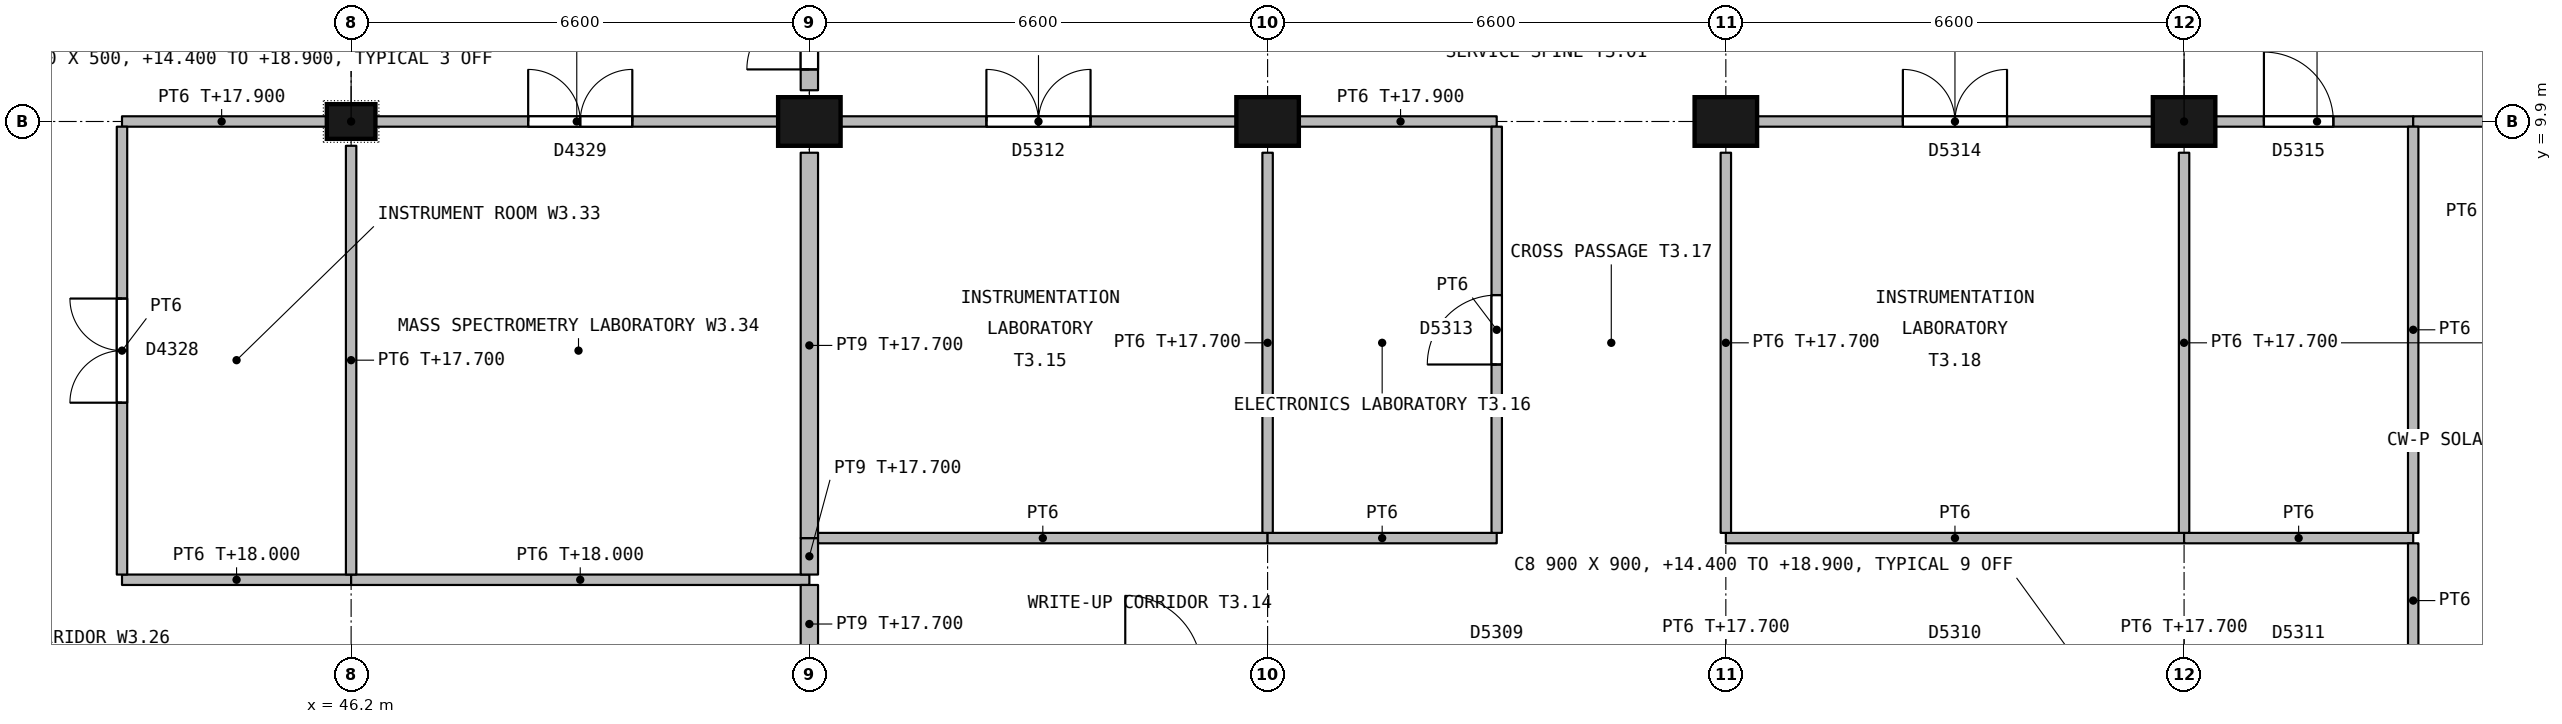
"""IFC4 building model, lengths in metres.
Left out: names, types, materials, properties, quantities, classifications, styles, units other than length and angle.
Written with IfcOpenShell. Run it as: python <this file> out.ifc"""

import sys

from ifc_helpers import new_model, si_unit, direction, frame, frame_2d, origin, origin_2d, place, context, subcontext, project, spatial, rectangle, extrude, element, fill, save


model = new_model("IFC4")
c1 = context("Model", 3, precision=1e-05, world=origin(), true_north=direction((0.0, 1.0)))
c2 = subcontext(c1, "Body", "Model", "MODEL_VIEW")
j1 = project(units=[si_unit("LENGTHUNIT", "METRE"), si_unit("PLANEANGLEUNIT", "RADIAN")], contexts=[c1])
p1 = place(None, origin())
s1 = spatial("IfcSite", under=j1, at=p1, CompositionType="ELEMENT")
p2 = place(p1, origin())
s2 = spatial("IfcBuilding", under=s1, at=p2, CompositionType="ELEMENT")
p3 = place(p2, frame((0.0, 0.0, 14.4)))
s3 = spatial("IfcBuildingStorey", under=s2, at=p3, CompositionType="ELEMENT", Elevation=14.4)
p4 = place(p3, frame((46.2, 9.9, 0.0), z_axis=(0.0, 0.0, 1.0), x_axis=(1.0, 0.0, 0.0)))
e1 = element("IfcColumn", 1, at=p4, inside=s3, PredefinedType="COLUMN", context=c2, shape_type="SweptSolid", body=[
    extrude(rectangle(XDim=0.7, YDim=0.5, at=origin_2d()), origin(), (0.0, 0.0, 1.0), 4.5),
])
for number, where, z_axis, x_axis in (
    (2, (52.8, 9.9, 0.0), (0.0, 0.0, 1.0), (1.0, 0.0, 0.0)),
    (3, (59.4, 9.9, 0.0), (0.0, 0.0, 1.0), (1.0, 0.0, 0.0)),
    (4, (66.0, 9.9, 0.0), (0.0, 0.0, 1.0), (1.0, 0.0, 0.0)),
    (5, (72.6, 9.9, 0.0), (0.0, 0.0, 1.0), (1.0, 0.0, 0.0)),
):
    element("IfcColumn", number, at=place(p3, frame(where, z_axis=z_axis, x_axis=x_axis)), inside=s3, PredefinedType="COLUMN", context=c2, shape_type="SweptSolid", body=[
        extrude(rectangle(XDim=0.9, YDim=0.7, at=origin_2d()), origin(), (0.0, 0.0, 1.0), 4.5),
    ])
p5 = place(p3, frame((42.9, 9.9, 0.0), z_axis=(0.0, 0.0, 1.0), x_axis=(1.0, 0.0, 0.0)))
e6 = element("IfcWall", 6, at=p5, inside=s3, PredefinedType="PARTITIONING", context=c2, shape_type="SweptSolid", body=[
    extrude(rectangle(XDim=2.95, YDim=0.15, at=frame_2d((1.475, 0.0))), origin(), (0.0, 0.0, 1.0), 3.5),
])
p6 = place(p3, frame((46.55, 9.9, 0.0), z_axis=(0.0, 0.0, 1.0), x_axis=(1.0, 0.0, 0.0)))
e7 = element("IfcWall", 7, at=p6, inside=s3, PredefinedType="PARTITIONING", context=c2, shape_type="SweptSolid", body=[
    extrude(rectangle(XDim=5.8, YDim=0.15, at=frame_2d((2.9, 0.0))), origin(), (0.0, 0.0, 1.0), 3.5),
])
p7 = place(p6, frame((2.2, 0.0, 0.0)))
e8 = element("IfcOpeningElement", 8, at=p7, cuts=e7, PredefinedType="OPENING", context=c2, shape_type="SweptSolid", body=[
    extrude(rectangle(XDim=1.5, YDim=2.1, at=frame_2d((0.75, 1.05))), frame((0.0, 0.085, 0.0), z_axis=(0.0, -1.0, 0.0), x_axis=(1.0, 0.0, 0.0)), (0.0, 0.0, 1.0), 0.17),
])
p8 = place(p3, frame((52.8, 10.35, 0.0), z_axis=(0.0, 0.0, 1.0), x_axis=(0.0, 1.0, 0.0)))
e9 = element("IfcWall", 9, at=p8, inside=s3, PredefinedType="PARTITIONING", context=c2, shape_type="SweptSolid", body=[
    extrude(rectangle(XDim=2.4, YDim=0.25, at=frame_2d((1.2, 0.0))), origin(), (0.0, 0.0, 1.0), 3.6),
])
p9 = place(p8, frame((0.3, 0.0, 0.0)))
e10 = element("IfcOpeningElement", 10, at=p9, cuts=e9, PredefinedType="OPENING", context=c2, shape_type="SweptSolid", body=[
    extrude(rectangle(XDim=1.8, YDim=2.1, at=frame_2d((0.9, 1.05))), frame((0.0, 0.135, 0.0), z_axis=(0.0, -1.0, 0.0), x_axis=(1.0, 0.0, 0.0)), (0.0, 0.0, 1.0), 0.27),
])
p10 = place(p3, frame((46.2, 3.3, 0.0), z_axis=(0.0, 0.0, 1.0), x_axis=(-1.0, 0.0, 0.0)))
e11 = element("IfcWall", 11, at=p10, inside=s3, PredefinedType="PARTITIONING", context=c2, shape_type="SweptSolid", body=[
    extrude(rectangle(XDim=3.3, YDim=0.15, at=frame_2d((1.65, 0.0))), origin(), (0.0, 0.0, 1.0), 3.6),
])
p11 = place(p3, frame((52.8, 3.3, 0.0), z_axis=(0.0, 0.0, 1.0), x_axis=(-1.0, 0.0, 0.0)))
e12 = element("IfcWall", 12, at=p11, inside=s3, PredefinedType="PARTITIONING", context=c2, shape_type="SweptSolid", body=[
    extrude(rectangle(XDim=6.6, YDim=0.15, at=frame_2d((3.3, 0.0))), origin(), (0.0, 0.0, 1.0), 3.6),
])
p12 = place(p3, frame((52.8, 2.1, 0.0), z_axis=(0.0, 0.0, 1.0), x_axis=(0.0, 1.0, 0.0)))
e13 = element("IfcWall", 13, at=p12, inside=s3, PredefinedType="PARTITIONING", context=c2, shape_type="SweptSolid", body=[
    extrude(rectangle(XDim=1.125, YDim=0.25, at=frame_2d((0.562, 0.0))), origin(), (0.0, 0.0, 1.0), 3.3),
])
p13 = place(p3, frame((42.9, 3.375, 0.0), z_axis=(0.0, 0.0, 1.0), x_axis=(0.0, 1.0, 0.0)))
e14 = element("IfcWall", 14, at=p13, inside=s3, PredefinedType="PARTITIONING", context=c2, shape_type="SweptSolid", body=[
    extrude(rectangle(XDim=6.45, YDim=0.15, at=frame_2d((3.225, 0.0))), origin(), (0.0, 0.0, 1.0), 4.2),
])
p14 = place(p13, frame((2.475, 0.0, 0.0)))
e15 = element("IfcOpeningElement", 15, at=p14, cuts=e14, PredefinedType="OPENING", context=c2, shape_type="SweptSolid", body=[
    extrude(rectangle(XDim=1.5, YDim=2.1, at=frame_2d((0.75, 1.05))), frame((0.0, 0.085, 0.0), z_axis=(0.0, -1.0, 0.0), x_axis=(1.0, 0.0, 0.0)), (0.0, 0.0, 1.0), 0.17),
])
p15 = place(p3, frame((46.2, 3.375, 0.0), z_axis=(0.0, 0.0, 1.0), x_axis=(0.0, 1.0, 0.0)))
e16 = element("IfcWall", 16, at=p15, inside=s3, PredefinedType="PARTITIONING", context=c2, shape_type="SweptSolid", body=[
    extrude(rectangle(XDim=6.175, YDim=0.15, at=frame_2d((3.087, 0.0))), origin(), (0.0, 0.0, 1.0), 3.3),
])
p16 = place(p3, frame((52.8, 3.375, 0.0), z_axis=(0.0, 0.0, 1.0), x_axis=(0.0, 1.0, 0.0)))
e17 = element("IfcWall", 17, at=p16, inside=s3, PredefinedType="PARTITIONING", context=c2, shape_type="SweptSolid", body=[
    extrude(rectangle(XDim=0.525, YDim=0.25, at=frame_2d((0.262, 0.0))), origin(), (0.0, 0.0, 1.0), 3.3),
])
p17 = place(p3, frame((52.8, 3.9, 0.0), z_axis=(0.0, 0.0, 1.0), x_axis=(0.0, 1.0, 0.0)))
e18 = element("IfcWall", 18, at=p17, inside=s3, PredefinedType="PARTITIONING", context=c2, shape_type="SweptSolid", body=[
    extrude(rectangle(XDim=5.55, YDim=0.25, at=frame_2d((2.775, 0.0))), origin(), (0.0, 0.0, 1.0), 3.3),
])
p18 = place(p3, frame((53.25, 9.9, 0.0), z_axis=(0.0, 0.0, 1.0), x_axis=(1.0, 0.0, 0.0)))
e19 = element("IfcWall", 19, at=p18, inside=s3, PredefinedType="PARTITIONING", context=c2, shape_type="SweptSolid", body=[
    extrude(rectangle(XDim=5.7, YDim=0.15, at=frame_2d((2.85, 0.0))), origin(), (0.0, 0.0, 1.0), 3.5),
])
p19 = place(p18, frame((2.1, 0.0, 0.0)))
e20 = element("IfcOpeningElement", 20, at=p19, cuts=e19, PredefinedType="OPENING", context=c2, shape_type="SweptSolid", body=[
    extrude(rectangle(XDim=1.5, YDim=2.1, at=frame_2d((0.75, 1.05))), frame((0.0, 0.085, 0.0), z_axis=(0.0, -1.0, 0.0), x_axis=(1.0, 0.0, 0.0)), (0.0, 0.0, 1.0), 0.17),
])
p20 = place(p3, frame((59.85, 9.9, 0.0), z_axis=(0.0, 0.0, 1.0), x_axis=(1.0, 0.0, 0.0)))
e21 = element("IfcWall", 21, at=p20, inside=s3, PredefinedType="PARTITIONING", context=c2, shape_type="SweptSolid", body=[
    extrude(rectangle(XDim=2.85, YDim=0.15, at=frame_2d((1.425, 0.0))), origin(), (0.0, 0.0, 1.0), 3.5),
])
p21 = place(p3, frame((66.45, 9.9, 0.0), z_axis=(0.0, 0.0, 1.0), x_axis=(1.0, 0.0, 0.0)))
e22 = element("IfcWall", 22, at=p21, inside=s3, PredefinedType="PARTITIONING", context=c2, shape_type="SweptSolid", body=[
    extrude(rectangle(XDim=5.7, YDim=0.15, at=frame_2d((2.85, 0.0))), origin(), (0.0, 0.0, 1.0), 3.5),
])
p22 = place(p21, frame((2.1, 0.0, 0.0)))
e23 = element("IfcOpeningElement", 23, at=p22, cuts=e22, PredefinedType="OPENING", context=c2, shape_type="SweptSolid", body=[
    extrude(rectangle(XDim=1.5, YDim=2.1, at=frame_2d((0.75, 1.05))), frame((0.0, 0.085, 0.0), z_axis=(0.0, -1.0, 0.0), x_axis=(1.0, 0.0, 0.0)), (0.0, 0.0, 1.0), 0.17),
])
p23 = place(p3, frame((73.05, 9.9, 0.0), z_axis=(0.0, 0.0, 1.0), x_axis=(1.0, 0.0, 0.0)))
e24 = element("IfcWall", 24, at=p23, inside=s3, PredefinedType="PARTITIONING", context=c2, shape_type="SweptSolid", body=[
    extrude(rectangle(XDim=2.85, YDim=0.15, at=frame_2d((1.425, 0.0))), origin(), (0.0, 0.0, 1.0), 3.5),
])
p24 = place(p23, frame((0.7, 0.0, 0.0)))
e25 = element("IfcOpeningElement", 25, at=p24, cuts=e24, PredefinedType="OPENING", context=c2, shape_type="SweptSolid", body=[
    extrude(rectangle(XDim=1.0, YDim=2.1, at=frame_2d((0.5, 1.05))), frame((0.0, 0.085, 0.0), z_axis=(0.0, -1.0, 0.0), x_axis=(1.0, 0.0, 0.0)), (0.0, 0.0, 1.0), 0.17),
])
p25 = place(p3, frame((75.9, 9.9, 0.0), z_axis=(0.0, 0.0, 1.0), x_axis=(1.0, 0.0, 0.0)))
e26 = element("IfcWall", 26, at=p25, inside=s3, PredefinedType="PARTITIONING", context=c2, shape_type="SweptSolid", body=[
    extrude(rectangle(XDim=2.85, YDim=0.15, at=frame_2d((1.425, 0.0))), origin(), (0.0, 0.0, 1.0), 3.5),
])
p26 = place(p25, frame((1.375, 0.0, 0.0)))
e27 = element("IfcOpeningElement", 27, at=p26, cuts=e26, PredefinedType="OPENING", context=c2, shape_type="SweptSolid", body=[
    extrude(rectangle(XDim=1.0, YDim=2.1, at=frame_2d((0.5, 1.05))), frame((0.0, 0.085, 0.0), z_axis=(0.0, -1.0, 0.0), x_axis=(1.0, 0.0, 0.0)), (0.0, 0.0, 1.0), 0.17),
])
p27 = place(p3, frame((59.4, 3.9, 0.0), z_axis=(0.0, 0.0, 1.0), x_axis=(-1.0, 0.0, 0.0)))
e28 = element("IfcWall", 28, at=p27, inside=s3, PredefinedType="PARTITIONING", context=c2, shape_type="SweptSolid", body=[
    extrude(rectangle(XDim=6.475, YDim=0.15, at=frame_2d((3.237, 0.0))), origin(), (0.0, 0.0, 1.0), 4.2),
])
p28 = place(p3, frame((62.7, 3.9, 0.0), z_axis=(0.0, 0.0, 1.0), x_axis=(-1.0, 0.0, 0.0)))
e29 = element("IfcWall", 29, at=p28, inside=s3, PredefinedType="PARTITIONING", context=c2, shape_type="SweptSolid", body=[
    extrude(rectangle(XDim=3.3, YDim=0.15, at=frame_2d((1.65, 0.0))), origin(), (0.0, 0.0, 1.0), 4.2),
])
p29 = place(p3, frame((72.6, 3.9, 0.0), z_axis=(0.0, 0.0, 1.0), x_axis=(-1.0, 0.0, 0.0)))
e30 = element("IfcWall", 30, at=p29, inside=s3, PredefinedType="PARTITIONING", context=c2, shape_type="SweptSolid", body=[
    extrude(rectangle(XDim=6.6, YDim=0.15, at=frame_2d((3.3, 0.0))), origin(), (0.0, 0.0, 1.0), 4.2),
])
p30 = place(p3, frame((75.9, 3.9, 0.0), z_axis=(0.0, 0.0, 1.0), x_axis=(-1.0, 0.0, 0.0)))
e31 = element("IfcWall", 31, at=p30, inside=s3, PredefinedType="PARTITIONING", context=c2, shape_type="SweptSolid", body=[
    extrude(rectangle(XDim=3.3, YDim=0.15, at=frame_2d((1.65, 0.0))), origin(), (0.0, 0.0, 1.0), 4.2),
])
p31 = place(p3, frame((75.9, 2.175, 0.0), z_axis=(0.0, 0.0, 1.0), x_axis=(0.0, 1.0, 0.0)))
e32 = element("IfcWall", 32, at=p31, inside=s3, PredefinedType="PARTITIONING", context=c2, shape_type="SweptSolid", body=[
    extrude(rectangle(XDim=1.65, YDim=0.15, at=frame_2d((0.825, 0.0))), origin(), (0.0, 0.0, 1.0), 4.2),
])
p32 = place(p3, frame((59.4, 3.975, 0.0), z_axis=(0.0, 0.0, 1.0), x_axis=(0.0, 1.0, 0.0)))
e33 = element("IfcWall", 33, at=p32, inside=s3, PredefinedType="PARTITIONING", context=c2, shape_type="SweptSolid", body=[
    extrude(rectangle(XDim=5.475, YDim=0.15, at=frame_2d((2.737, 0.0))), origin(), (0.0, 0.0, 1.0), 3.3),
])
p33 = place(p3, frame((62.7, 9.825, 0.0), z_axis=(0.0, 0.0, 1.0), x_axis=(0.0, -1.0, 0.0)))
e34 = element("IfcWall", 34, at=p33, inside=s3, PredefinedType="PARTITIONING", context=c2, shape_type="SweptSolid", body=[
    extrude(rectangle(XDim=5.85, YDim=0.15, at=frame_2d((2.925, 0.0))), origin(), (0.0, 0.0, 1.0), 4.2),
])
p34 = place(p33, frame((2.425, 0.0, 0.0)))
e35 = element("IfcOpeningElement", 35, at=p34, cuts=e34, PredefinedType="OPENING", context=c2, shape_type="SweptSolid", body=[
    extrude(rectangle(XDim=1.0, YDim=2.1, at=frame_2d((0.5, 1.05))), frame((0.0, 0.085, 0.0), z_axis=(0.0, -1.0, 0.0), x_axis=(1.0, 0.0, 0.0)), (0.0, 0.0, 1.0), 0.17),
])
for number, where, z_axis, x_axis in (
    (36, (66.0, 3.975, 0.0), (0.0, 0.0, 1.0), (0.0, 1.0, 0.0)),
    (37, (72.6, 3.975, 0.0), (0.0, 0.0, 1.0), (0.0, 1.0, 0.0)),
):
    element("IfcWall", number, at=place(p3, frame(where, z_axis=z_axis, x_axis=x_axis)), inside=s3, PredefinedType="PARTITIONING", context=c2, shape_type="SweptSolid", body=[
        extrude(rectangle(XDim=5.475, YDim=0.15, at=frame_2d((2.737, 0.0))), origin(), (0.0, 0.0, 1.0), 3.3),
    ])
p35 = place(p3, frame((75.9, 3.975, 0.0), z_axis=(0.0, 0.0, 1.0), x_axis=(0.0, 1.0, 0.0)))
e38 = element("IfcWall", 38, at=p35, inside=s3, PredefinedType="PARTITIONING", context=c2, shape_type="SweptSolid", body=[
    extrude(rectangle(XDim=5.85, YDim=0.15, at=frame_2d((2.925, 0.0))), origin(), (0.0, 0.0, 1.0), 4.2),
])
p36 = place(p9, origin())
e39 = element("IfcDoor", 39, at=p36, inside=s3, OperationType="DOUBLE_DOOR_SINGLE_SWING", PredefinedType="DOOR", context=c2, shape_type="SweptSolid", body=[
    extrude(rectangle(XDim=1.8, YDim=2.1, at=frame_2d((0.9, 1.05))), frame((0.0, 0.03, 0.0), z_axis=(0.0, -1.0, 0.0), x_axis=(1.0, 0.0, 0.0)), (0.0, 0.0, 1.0), 0.06),
])
fill(e10, e39)
p37 = place(p14, origin())
e40 = element("IfcDoor", 40, at=p37, inside=s3, OperationType="DOUBLE_DOOR_SINGLE_SWING", PredefinedType="DOOR", context=c2, shape_type="SweptSolid", body=[
    extrude(rectangle(XDim=1.5, YDim=2.1, at=frame_2d((0.75, 1.05))), frame((0.0, 0.027, 0.0), z_axis=(0.0, -1.0, 0.0), x_axis=(1.0, 0.0, 0.0)), (0.0, 0.0, 1.0), 0.054),
])
fill(e15, e40)
p38 = place(p7, origin())
e41 = element("IfcDoor", 41, at=p38, inside=s3, OperationType="DOUBLE_DOOR_SINGLE_SWING", PredefinedType="DOOR", context=c2, shape_type="SweptSolid", body=[
    extrude(rectangle(XDim=1.5, YDim=2.1, at=frame_2d((0.75, 1.05))), frame((0.0, 0.027, 0.0), z_axis=(0.0, -1.0, 0.0), x_axis=(1.0, 0.0, 0.0)), (0.0, 0.0, 1.0), 0.054),
])
fill(e8, e41)
p39 = place(p19, origin())
e42 = element("IfcDoor", 42, at=p39, inside=s3, OperationType="DOUBLE_DOOR_SINGLE_SWING", PredefinedType="DOOR", context=c2, shape_type="SweptSolid", body=[
    extrude(rectangle(XDim=1.5, YDim=2.1, at=frame_2d((0.75, 1.05))), frame((0.0, 0.027, 0.0), z_axis=(0.0, -1.0, 0.0), x_axis=(1.0, 0.0, 0.0)), (0.0, 0.0, 1.0), 0.054),
])
fill(e20, e42)
p40 = place(p34, origin())
e43 = element("IfcDoor", 43, at=p40, inside=s3, OperationType="SINGLE_SWING_RIGHT", PredefinedType="DOOR", context=c2, shape_type="SweptSolid", body=[
    extrude(rectangle(XDim=1.0, YDim=2.1, at=frame_2d((0.5, 1.05))), frame((0.0, 0.027, 0.0), z_axis=(0.0, -1.0, 0.0), x_axis=(1.0, 0.0, 0.0)), (0.0, 0.0, 1.0), 0.054),
])
fill(e35, e43)
p41 = place(p22, origin())
e44 = element("IfcDoor", 44, at=p41, inside=s3, OperationType="DOUBLE_DOOR_SINGLE_SWING", PredefinedType="DOOR", context=c2, shape_type="SweptSolid", body=[
    extrude(rectangle(XDim=1.5, YDim=2.1, at=frame_2d((0.75, 1.05))), frame((0.0, 0.027, 0.0), z_axis=(0.0, -1.0, 0.0), x_axis=(1.0, 0.0, 0.0)), (0.0, 0.0, 1.0), 0.054),
])
fill(e23, e44)
p42 = place(p24, origin())
e45 = element("IfcDoor", 45, at=p42, inside=s3, OperationType="SINGLE_SWING_LEFT", PredefinedType="DOOR", context=c2, shape_type="SweptSolid", body=[
    extrude(rectangle(XDim=1.0, YDim=2.1, at=frame_2d((0.5, 1.05))), frame((0.0, 0.027, 0.0), z_axis=(0.0, -1.0, 0.0), x_axis=(1.0, 0.0, 0.0)), (0.0, 0.0, 1.0), 0.054),
])
fill(e25, e45)
save(model, sys.argv[1])
